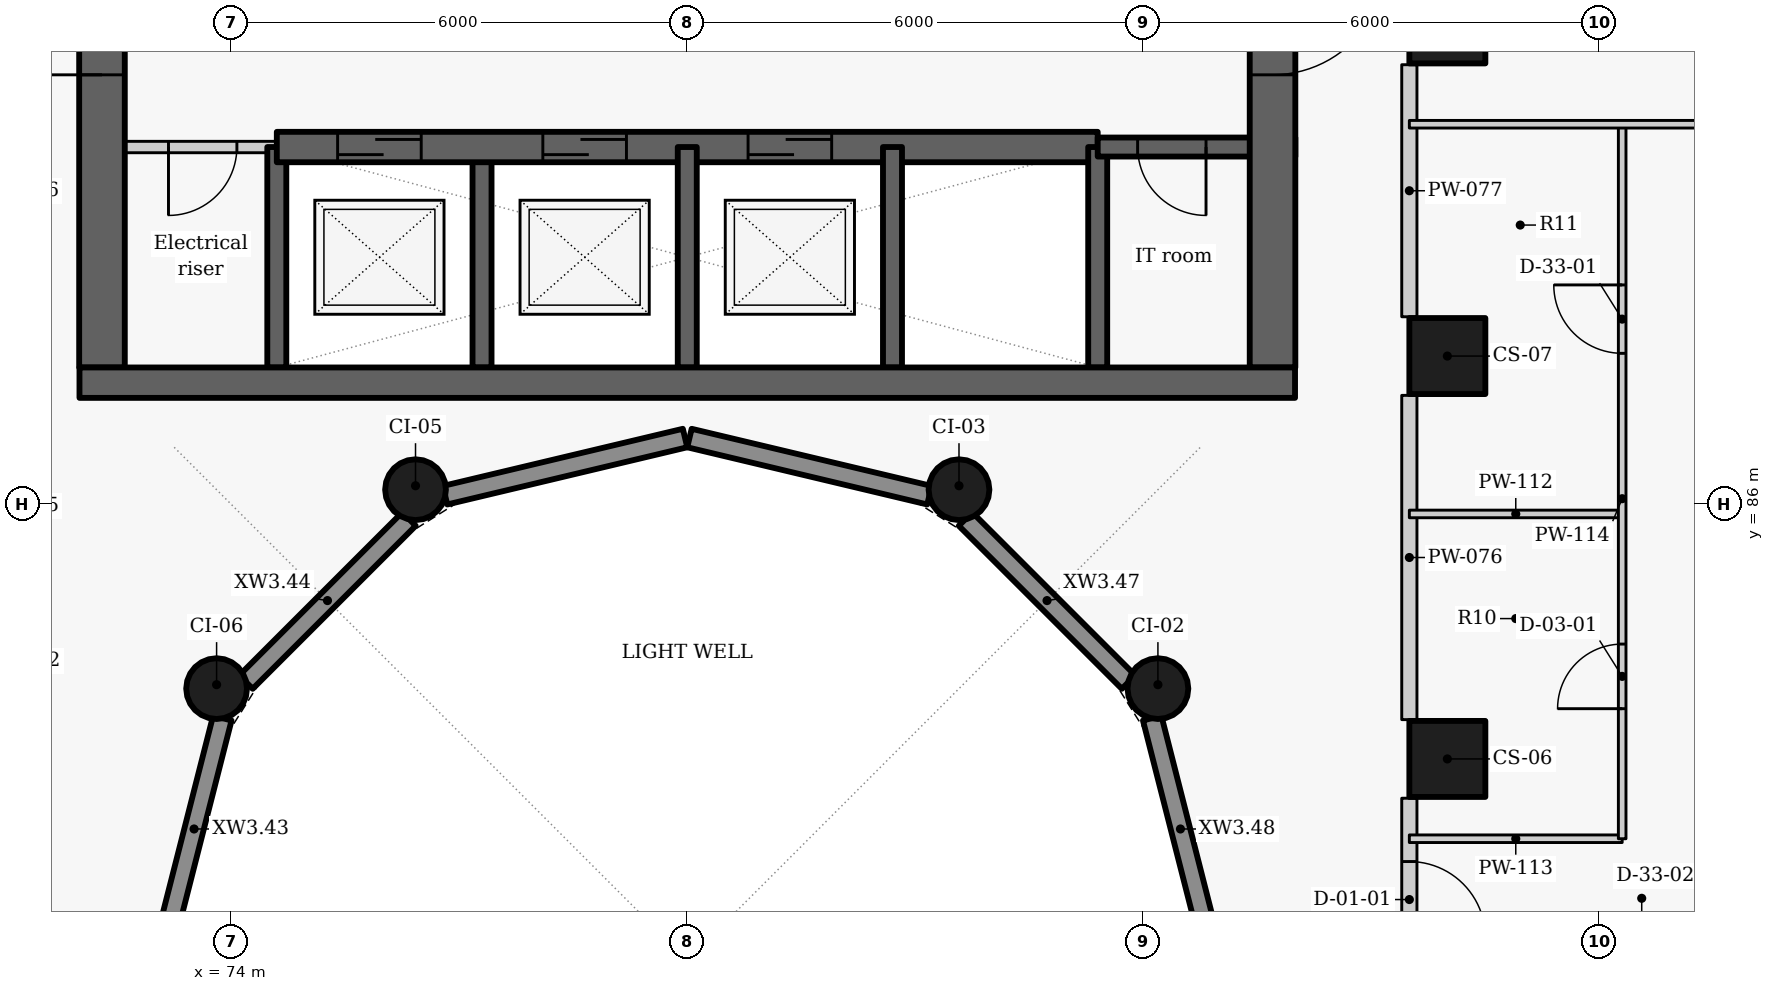
"""IFC4 building model, lengths in metres.
Left out: names, types, materials, properties, quantities, classifications, styles, units other than length and angle.
Written with IfcOpenShell. Run it as: python <this file> out.ifc"""

import sys

from ifc_helpers import new_model, si_unit, direction, frame, frame_2d, origin, origin_2d, place, context, subcontext, project, spatial, rectangle, circle, extrude, element, fill, save


model = new_model("IFC4")
c1 = context("Model", 3, precision=1e-05, world=origin(), true_north=direction((0.0, 1.0)))
c2 = subcontext(c1, "Body", "Model", "MODEL_VIEW")
j1 = project(units=[si_unit("LENGTHUNIT", "METRE"), si_unit("PLANEANGLEUNIT", "RADIAN")], contexts=[c1])
p1 = place(None, origin())
s1 = spatial("IfcSite", under=j1, at=p1, CompositionType="ELEMENT")
p2 = place(p1, origin())
s2 = spatial("IfcBuilding", under=s1, at=p2, CompositionType="ELEMENT")
p3 = place(p2, frame((0.0, 0.0, 114.0)))
s3 = spatial("IfcBuildingStorey", under=s2, at=p3, CompositionType="ELEMENT", Elevation=114.0)
for number, where, z_axis, x_axis in (
    (1, (90.0, 82.65, 0.0), (0.0, 0.0, 1.0), (0.0, 1.0, 0.0)),
    (2, (90.0, 87.95, 0.0), (0.0, 0.0, 1.0), (0.0, 1.0, 0.0)),
    (3, (90.0, 92.3, 0.0), (0.0, 0.0, 1.0), (0.0, 1.0, 0.0)),
):
    element("IfcColumn", number, at=place(p3, frame(where, z_axis=z_axis, x_axis=x_axis)), inside=s3, PredefinedType="COLUMN", context=c2, shape_type="SweptSolid", body=[
        extrude(rectangle(XDim=1.0, YDim=1.0, at=origin_2d()), origin(), (0.0, 0.0, 1.0), 3.3),
    ])
for number, where, z_axis, x_axis in (
    (4, (86.192, 83.575, 0.0), (0.0, 0.0, 1.0), (-0.5, 0.866, 0.0)),
    (5, (83.575, 86.192, 0.0), (0.0, 0.0, 1.0), (-0.866, 0.5, 0.0)),
    (6, (76.425, 86.192, 0.0), (0.0, 0.0, 1.0), (-0.866, -0.5, 0.0)),
    (7, (73.808, 83.575, 0.0), (0.0, 0.0, 1.0), (-0.5, -0.866, 0.0)),
):
    element("IfcColumn", number, at=place(p3, frame(where, z_axis=z_axis, x_axis=x_axis)), inside=s3, PredefinedType="COLUMN", context=c2, shape_type="SweptSolid", body=[
        extrude(circle(Radius=0.4, at=origin_2d()), origin(), (0.0, 0.0, 1.0), 3.3),
    ])
p4 = place(p3, frame((73.14, 80.27, 0.0), z_axis=(0.0, 0.0, 1.0), x_axis=(0.247055971283, 0.969001211069, 0.0)))
e8 = element("IfcWall", 8, at=p4, inside=s3, PredefinedType="SOLIDWALL", context=c2, shape_type="SweptSolid", body=[
    extrude(rectangle(XDim=3.01, YDim=0.25, at=frame_2d((1.505, 0.0))), origin(), (0.0, 0.0, 1.0), 2.425),
])
p5 = place(p3, frame((74.194, 83.661, 0.0), z_axis=(0.0, 0.0, 1.0), x_axis=(0.707106781187, 0.707106781187, 0.0)))
e9 = element("IfcWall", 9, at=p5, inside=s3, PredefinedType="SOLIDWALL", context=c2, shape_type="SweptSolid", body=[
    extrude(rectangle(XDim=3.033, YDim=0.25, at=frame_2d((1.517, 0.0))), origin(), (0.0, 0.0, 1.0), 2.425),
])
for number, where, z_axis, x_axis in (
    (10, (76.814, 86.119, 0.0), (0.0, 0.0, 1.0), (0.973, 0.232, 0.0)),
    (11, (80.029, 86.872, 0.0), (0.0, 0.0, 1.0), (0.973, -0.232, 0.0)),
):
    element("IfcWall", number, at=place(p3, frame(where, z_axis=z_axis, x_axis=x_axis)), inside=s3, PredefinedType="SOLIDWALL", context=c2, shape_type="SweptSolid", body=[
        extrude(rectangle(XDim=3.246, YDim=0.25, at=frame_2d((1.623, 0.0))), origin(), (0.0, 0.0, 1.0), 2.425),
    ])
p6 = place(p3, frame((83.661, 85.806, 0.0), z_axis=(0.0, 0.0, 1.0), x_axis=(0.707106781187, -0.707106781187, 0.0)))
e12 = element("IfcWall", 12, at=p6, inside=s3, PredefinedType="SOLIDWALL", context=c2, shape_type="SweptSolid", body=[
    extrude(rectangle(XDim=3.033, YDim=0.25, at=frame_2d((1.517, 0.0))), origin(), (0.0, 0.0, 1.0), 2.425),
])
p7 = place(p3, frame((86.117, 83.187, 0.0), z_axis=(0.0, 0.0, 1.0), x_axis=(0.247055971283, -0.969001211069, 0.0)))
e13 = element("IfcWall", 13, at=p7, inside=s3, PredefinedType="SOLIDWALL", context=c2, shape_type="SweptSolid", body=[
    extrude(rectangle(XDim=3.01, YDim=0.25, at=frame_2d((1.505, 0.0))), origin(), (0.0, 0.0, 1.0), 2.425),
])
p8 = place(p3, frame((74.6, 87.8, -0.275), z_axis=(0.0, 0.0, 1.0), x_axis=(0.0, 1.0, 0.0)))
e14 = element("IfcWall", 14, at=p8, inside=s3, PredefinedType="SHEAR", context=c2, shape_type="SweptSolid", body=[
    extrude(rectangle(XDim=2.9, YDim=0.25, at=frame_2d((1.45, 0.0))), origin(), (0.0, 0.0, 1.0), 3.3),
])
p9 = place(p3, frame((74.6, 90.7, 0.0), z_axis=(0.0, 0.0, 1.0), x_axis=(-1.0, 0.0, 0.0)))
e15 = element("IfcWall", 15, at=p9, inside=s3, PredefinedType="PARTITIONING", context=c2, shape_type="SweptSolid", body=[
    extrude(rectangle(XDim=2.6, YDim=0.15, at=frame_2d((1.3, 0.0))), origin(), (0.0, 0.0, 1.0), 3.025),
])
p10 = place(p9, frame((0.525, 0.0, 0.0)))
e16 = element("IfcOpeningElement", 16, at=p10, cuts=e15, PredefinedType="OPENING", context=c2, shape_type="SweptSolid", body=[
    extrude(rectangle(XDim=0.9, YDim=2.1, at=frame_2d((0.45, 1.05))), frame((0.0, 0.085, 0.0), z_axis=(0.0, -1.0, 0.0), x_axis=(1.0, 0.0, 0.0)), (0.0, 0.0, 1.0), 0.17),
])
p11 = place(p3, frame((72.3, 87.8, -0.275), z_axis=(0.0, 0.0, 1.0), x_axis=(0.0, 1.0, 0.0)))
e17 = element("IfcWall", 17, at=p11, inside=s3, PredefinedType="SHEAR", context=c2, shape_type="SweptSolid", body=[
    extrude(rectangle(XDim=9.1, YDim=0.6, at=frame_2d((4.55, 0.0))), origin(), (0.0, 0.0, 1.0), 3.3),
])
p12 = place(p11, frame((3.85, 0.0, 0.275)))
e18 = element("IfcOpeningElement", 18, at=p12, cuts=e17, PredefinedType="OPENING", context=c2, shape_type="SweptSolid", body=[
    extrude(rectangle(XDim=1.5, YDim=2.1, at=frame_2d((0.75, 1.05))), frame((0.0, 0.31, 0.0), z_axis=(0.0, -1.0, 0.0), x_axis=(1.0, 0.0, 0.0)), (0.0, 0.0, 1.0), 0.62),
])
p13 = place(p3, frame((77.3, 87.8, -0.275), z_axis=(0.0, 0.0, 1.0), x_axis=(0.0, 1.0, 0.0)))
e19 = element("IfcWall", 19, at=p13, inside=s3, PredefinedType="SHEAR", context=c2, shape_type="SweptSolid", body=[
    extrude(rectangle(XDim=2.9, YDim=0.25, at=frame_2d((1.45, 0.0))), origin(), (0.0, 0.0, 1.0), 3.3),
])
p14 = place(p3, frame((74.6, 90.7, -0.275), z_axis=(0.0, 0.0, 1.0), x_axis=(1.0, 0.0, 0.0)))
e20 = element("IfcWall", 20, at=p14, inside=s3, PredefinedType="SHEAR", context=c2, shape_type="SweptSolid", body=[
    extrude(rectangle(XDim=10.8, YDim=0.4, at=frame_2d((5.4, 0.0))), origin(), (0.0, 0.0, 1.0), 3.3),
])
p15 = place(p14, frame((0.8, 0.0, 0.275)))
e21 = element("IfcOpeningElement", 21, at=p15, cuts=e20, PredefinedType="OPENING", context=c2, shape_type="SweptSolid", body=[
    extrude(rectangle(XDim=1.1, YDim=2.1, at=frame_2d((0.55, 1.05))), frame((0.0, 0.21, 0.0), z_axis=(0.0, -1.0, 0.0), x_axis=(1.0, 0.0, 0.0)), (0.0, 0.0, 1.0), 0.42),
])
p16 = place(p14, frame((3.5, 0.0, 0.275)))
e22 = element("IfcOpeningElement", 22, at=p16, cuts=e20, PredefinedType="OPENING", context=c2, shape_type="SweptSolid", body=[
    extrude(rectangle(XDim=1.1, YDim=2.1, at=frame_2d((0.55, 1.05))), frame((0.0, 0.21, 0.0), z_axis=(0.0, -1.0, 0.0), x_axis=(1.0, 0.0, 0.0)), (0.0, 0.0, 1.0), 0.42),
])
p17 = place(p14, frame((6.2, 0.0, 0.275)))
e23 = element("IfcOpeningElement", 23, at=p17, cuts=e20, PredefinedType="OPENING", context=c2, shape_type="SweptSolid", body=[
    extrude(rectangle(XDim=1.1, YDim=2.1, at=frame_2d((0.55, 1.05))), frame((0.0, 0.21, 0.0), z_axis=(0.0, -1.0, 0.0), x_axis=(1.0, 0.0, 0.0)), (0.0, 0.0, 1.0), 0.42),
])
for number, where, z_axis, x_axis in (
    (24, (80.0, 87.8, -0.275), (0.0, 0.0, 1.0), (0.0, 1.0, 0.0)),
    (25, (82.7, 87.8, -0.275), (0.0, 0.0, 1.0), (0.0, 1.0, 0.0)),
    (26, (85.4, 87.8, -0.275), (0.0, 0.0, 1.0), (0.0, 1.0, 0.0)),
):
    element("IfcWall", number, at=place(p3, frame(where, z_axis=z_axis, x_axis=x_axis)), inside=s3, PredefinedType="SHEAR", context=c2, shape_type="SweptSolid", body=[
        extrude(rectangle(XDim=2.9, YDim=0.25, at=frame_2d((1.45, 0.0))), origin(), (0.0, 0.0, 1.0), 3.3),
    ])
p18 = place(p3, frame((88.0, 90.7, -0.275), z_axis=(0.0, 0.0, 1.0), x_axis=(-1.0, 0.0, 0.0)))
e27 = element("IfcWall", 27, at=p18, inside=s3, PredefinedType="SHEAR", context=c2, shape_type="SweptSolid", body=[
    extrude(rectangle(XDim=2.6, YDim=0.25, at=frame_2d((1.3, 0.0))), origin(), (0.0, 0.0, 1.0), 3.3),
])
p19 = place(p18, frame((1.175, 0.0, 0.275)))
e28 = element("IfcOpeningElement", 28, at=p19, cuts=e27, PredefinedType="OPENING", context=c2, shape_type="SweptSolid", body=[
    extrude(rectangle(XDim=0.9, YDim=2.1, at=frame_2d((0.45, 1.05))), frame((0.0, 0.135, 0.0), z_axis=(0.0, -1.0, 0.0), x_axis=(1.0, 0.0, 0.0)), (0.0, 0.0, 1.0), 0.27),
])
p20 = place(p3, frame((87.7, 103.4, -0.275), z_axis=(0.0, 0.0, 1.0), x_axis=(0.0, -1.0, 0.0)))
e29 = element("IfcWall", 29, at=p20, inside=s3, PredefinedType="SHEAR", context=c2, shape_type="SweptSolid", body=[
    extrude(rectangle(XDim=15.6, YDim=0.6, at=frame_2d((7.8, 0.0))), origin(), (0.0, 0.0, 1.0), 3.3),
])
p21 = place(p20, frame((10.25, 0.0, 0.275)))
e30 = element("IfcOpeningElement", 30, at=p21, cuts=e29, PredefinedType="OPENING", context=c2, shape_type="SweptSolid", body=[
    extrude(rectangle(XDim=1.5, YDim=2.1, at=frame_2d((0.75, 1.05))), frame((0.0, 0.31, 0.0), z_axis=(0.0, -1.0, 0.0), x_axis=(1.0, 0.0, 0.0)), (0.0, 0.0, 1.0), 0.62),
])
p22 = place(p20, frame((2.7, 0.0, 0.275)))
e31 = element("IfcOpeningElement", 31, at=p22, cuts=e29, PredefinedType="OPENING", context=c2, shape_type="SweptSolid", body=[
    extrude(rectangle(XDim=1.1, YDim=2.1, at=frame_2d((0.55, 1.05))), frame((0.0, 0.31, 0.0), z_axis=(0.0, -1.0, 0.0), x_axis=(1.0, 0.0, 0.0)), (0.0, 0.0, 1.0), 0.62),
])
p23 = place(p3, frame((89.5, 82.133, 0.0), z_axis=(0.0, 0.0, 1.0), x_axis=(0.0, -1.0, 0.0)))
e32 = element("IfcWall", 32, at=p23, inside=s3, PredefinedType="PARTITIONING", context=c2, shape_type="SweptSolid", body=[
    extrude(rectangle(XDim=4.266, YDim=0.2, at=frame_2d((2.133, 0.0))), origin(), (0.0, 0.0, 1.0), 3.025),
])
p24 = place(p23, frame((0.833, 0.0, 0.0)))
e33 = element("IfcOpeningElement", 33, at=p24, cuts=e32, PredefinedType="OPENING", context=c2, shape_type="SweptSolid", body=[
    extrude(rectangle(XDim=1.0, YDim=2.1, at=frame_2d((0.5, 1.05))), frame((0.0, 0.11, 0.0), z_axis=(0.0, -1.0, 0.0), x_axis=(1.0, 0.0, 0.0)), (0.0, 0.0, 1.0), 0.22),
])
p25 = place(p3, frame((89.5, 83.167, 0.0), z_axis=(0.0, 0.0, 1.0), x_axis=(0.0, 1.0, 0.0)))
e34 = element("IfcWall", 34, at=p25, inside=s3, PredefinedType="PARTITIONING", context=c2, shape_type="SweptSolid", body=[
    extrude(rectangle(XDim=4.266, YDim=0.2, at=frame_2d((2.133, 0.0))), origin(), (0.0, 0.0, 1.0), 3.025),
])
p26 = place(p3, frame((89.5, 88.467, 0.0), z_axis=(0.0, 0.0, 1.0), x_axis=(0.0, 1.0, 0.0)))
e35 = element("IfcWall", 35, at=p26, inside=s3, PredefinedType="PARTITIONING", context=c2, shape_type="SweptSolid", body=[
    extrude(rectangle(XDim=3.316, YDim=0.2, at=frame_2d((1.658, 0.0))), origin(), (0.0, 0.0, 1.0), 3.025),
])
for number, where, z_axis, x_axis in (
    (36, (89.5, 85.873, 0.0), (0.0, 0.0, 1.0), (1.0, 0.0, 0.0)),
    (37, (89.5, 81.6, 0.0), (0.0, 0.0, 1.0), (1.0, 0.0, 0.0)),
):
    element("IfcWall", number, at=place(p3, frame(where, z_axis=z_axis, x_axis=x_axis)), inside=s3, PredefinedType="PARTITIONING", context=c2, shape_type="SweptSolid", body=[
        extrude(rectangle(XDim=2.8, YDim=0.1, at=frame_2d((1.4, 0.0))), origin(), (0.0, 0.0, 1.0), 2.505),
    ])
p27 = place(p3, frame((92.3, 81.6, 0.0), z_axis=(0.0, 0.0, 1.0), x_axis=(0.0, 1.0, 0.0)))
e38 = element("IfcWall", 38, at=p27, inside=s3, PredefinedType="PARTITIONING", context=c2, shape_type="SweptSolid", body=[
    extrude(rectangle(XDim=9.4, YDim=0.1, at=frame_2d((4.7, 0.0))), origin(), (0.0, 0.0, 1.0), 3.025),
])
p28 = place(p27, frame((1.711, 0.0, 0.0)))
e39 = element("IfcOpeningElement", 39, at=p28, cuts=e38, PredefinedType="OPENING", context=c2, shape_type="SweptSolid", body=[
    extrude(rectangle(XDim=0.85, YDim=2.1, at=frame_2d((0.425, 1.05))), frame((0.0, 0.06, 0.0), z_axis=(0.0, -1.0, 0.0), x_axis=(1.0, 0.0, 0.0)), (0.0, 0.0, 1.0), 0.12),
])
p29 = place(p27, frame((6.386, 0.0, 0.0)))
e40 = element("IfcOpeningElement", 40, at=p29, cuts=e38, PredefinedType="OPENING", context=c2, shape_type="SweptSolid", body=[
    extrude(rectangle(XDim=0.9, YDim=2.1, at=frame_2d((0.45, 1.05))), frame((0.0, 0.06, 0.0), z_axis=(0.0, -1.0, 0.0), x_axis=(1.0, 0.0, 0.0)), (0.0, 0.0, 1.0), 0.12),
])
p30 = place(p3, frame((89.5, 91.0, 0.0), z_axis=(0.0, 0.0, 1.0), x_axis=(1.0, 0.0, 0.0)))
e41 = element("IfcWall", 41, at=p30, inside=s3, PredefinedType="PARTITIONING", context=c2, shape_type="SweptSolid", body=[
    extrude(rectangle(XDim=11.515, YDim=0.1, at=frame_2d((5.758, 0.0))), origin(), (0.0, 0.0, 1.0), 2.405),
])
p31 = place(p3, frame((72.004, 87.6, -0.275), z_axis=(0.0, 0.0, 1.0), x_axis=(1.0, 0.0, 0.0)))
e42 = element("IfcWall", 42, at=p31, inside=s3, PredefinedType="SHEAR", context=c2, shape_type="SweptSolid", body=[
    extrude(rectangle(XDim=15.992, YDim=0.4, at=frame_2d((7.996, 0.0))), origin(), (0.0, 0.0, 1.0), 3.3),
])
p32 = place(p10, origin())
e43 = element("IfcDoor", 43, at=p32, inside=s3, OperationType="SINGLE_SWING_RIGHT", PredefinedType="DOOR", context=c2, shape_type="SweptSolid", body=[
    extrude(rectangle(XDim=0.9, YDim=2.1, at=frame_2d((0.45, 1.05))), frame((0.0, 0.025, 0.0), z_axis=(0.0, -1.0, 0.0), x_axis=(1.0, 0.0, 0.0)), (0.0, 0.0, 1.0), 0.05),
])
fill(e16, e43)
p33 = place(p15, origin())
e44 = element("IfcDoor", 44, at=p33, inside=s3, OperationType="SLIDING_TO_LEFT", PredefinedType="DOOR", context=c2, shape_type="SweptSolid", body=[
    extrude(rectangle(XDim=1.1, YDim=2.1, at=frame_2d((0.55, 1.05))), frame((0.0, 0.025, 0.0), z_axis=(0.0, -1.0, 0.0), x_axis=(1.0, 0.0, 0.0)), (0.0, 0.0, 1.0), 0.05),
])
fill(e21, e44)
p34 = place(p16, origin())
e45 = element("IfcDoor", 45, at=p34, inside=s3, OperationType="SLIDING_TO_LEFT", PredefinedType="DOOR", context=c2, shape_type="SweptSolid", body=[
    extrude(rectangle(XDim=1.1, YDim=2.1, at=frame_2d((0.55, 1.05))), frame((0.0, 0.025, 0.0), z_axis=(0.0, -1.0, 0.0), x_axis=(1.0, 0.0, 0.0)), (0.0, 0.0, 1.0), 0.05),
])
fill(e22, e45)
p35 = place(p17, origin())
e46 = element("IfcDoor", 46, at=p35, inside=s3, OperationType="SLIDING_TO_LEFT", PredefinedType="DOOR", context=c2, shape_type="SweptSolid", body=[
    extrude(rectangle(XDim=1.1, YDim=2.1, at=frame_2d((0.55, 1.05))), frame((0.0, 0.025, 0.0), z_axis=(0.0, -1.0, 0.0), x_axis=(1.0, 0.0, 0.0)), (0.0, 0.0, 1.0), 0.05),
])
fill(e23, e46)
p36 = place(p19, origin())
e47 = element("IfcDoor", 47, at=p36, inside=s3, OperationType="SINGLE_SWING_LEFT", PredefinedType="DOOR", context=c2, shape_type="SweptSolid", body=[
    extrude(rectangle(XDim=0.9, YDim=2.1, at=frame_2d((0.45, 1.05))), frame((0.0, 0.025, 0.0), z_axis=(0.0, -1.0, 0.0), x_axis=(1.0, 0.0, 0.0)), (0.0, 0.0, 1.0), 0.05),
])
fill(e28, e47)
p37 = place(p24, origin())
e48 = element("IfcDoor", 48, at=p37, inside=s3, OperationType="SINGLE_SWING_RIGHT", PredefinedType="DOOR", context=c2, shape_type="SweptSolid", body=[
    extrude(rectangle(XDim=1.0, YDim=2.1, at=frame_2d((0.5, 1.05))), frame((0.0, 0.025, 0.0), z_axis=(0.0, -1.0, 0.0), x_axis=(1.0, 0.0, 0.0)), (0.0, 0.0, 1.0), 0.05),
])
fill(e33, e48)
p38 = place(p28, origin())
e49 = element("IfcDoor", 49, at=p38, inside=s3, OperationType="SINGLE_SWING_LEFT", PredefinedType="DOOR", context=c2, shape_type="SweptSolid", body=[
    extrude(rectangle(XDim=0.85, YDim=2.1, at=frame_2d((0.425, 1.05))), frame((0.0, 0.025, 0.0), z_axis=(0.0, -1.0, 0.0), x_axis=(1.0, 0.0, 0.0)), (0.0, 0.0, 1.0), 0.05),
])
fill(e39, e49)
p39 = place(p29, origin())
e50 = element("IfcDoor", 50, at=p39, inside=s3, OperationType="SINGLE_SWING_RIGHT", PredefinedType="DOOR", context=c2, shape_type="SweptSolid", body=[
    extrude(rectangle(XDim=0.9, YDim=2.1, at=frame_2d((0.45, 1.05))), frame((0.0, 0.025, 0.0), z_axis=(0.0, -1.0, 0.0), x_axis=(1.0, 0.0, 0.0)), (0.0, 0.0, 1.0), 0.05),
])
fill(e40, e50)
p40 = place(p21, origin())
e51 = element("IfcDoor", 51, at=p40, inside=s3, OperationType="DOUBLE_DOOR_SINGLE_SWING", PredefinedType="DOOR", context=c2, shape_type="SweptSolid", body=[
    extrude(rectangle(XDim=1.5, YDim=2.1, at=frame_2d((0.75, 1.05))), frame((0.0, 0.025, 0.0), z_axis=(0.0, -1.0, 0.0), x_axis=(1.0, 0.0, 0.0)), (0.0, 0.0, 1.0), 0.05),
])
fill(e30, e51)
p41 = place(p12, origin())
e52 = element("IfcDoor", 52, at=p41, inside=s3, OperationType="DOUBLE_DOOR_SINGLE_SWING", PredefinedType="DOOR", context=c2, shape_type="SweptSolid", body=[
    extrude(rectangle(XDim=1.5, YDim=2.1, at=frame_2d((0.75, 1.05))), frame((0.0, 0.025, 0.0), z_axis=(0.0, -1.0, 0.0), x_axis=(1.0, 0.0, 0.0)), (0.0, 0.0, 1.0), 0.05),
])
fill(e18, e52)
save(model, sys.argv[1])
